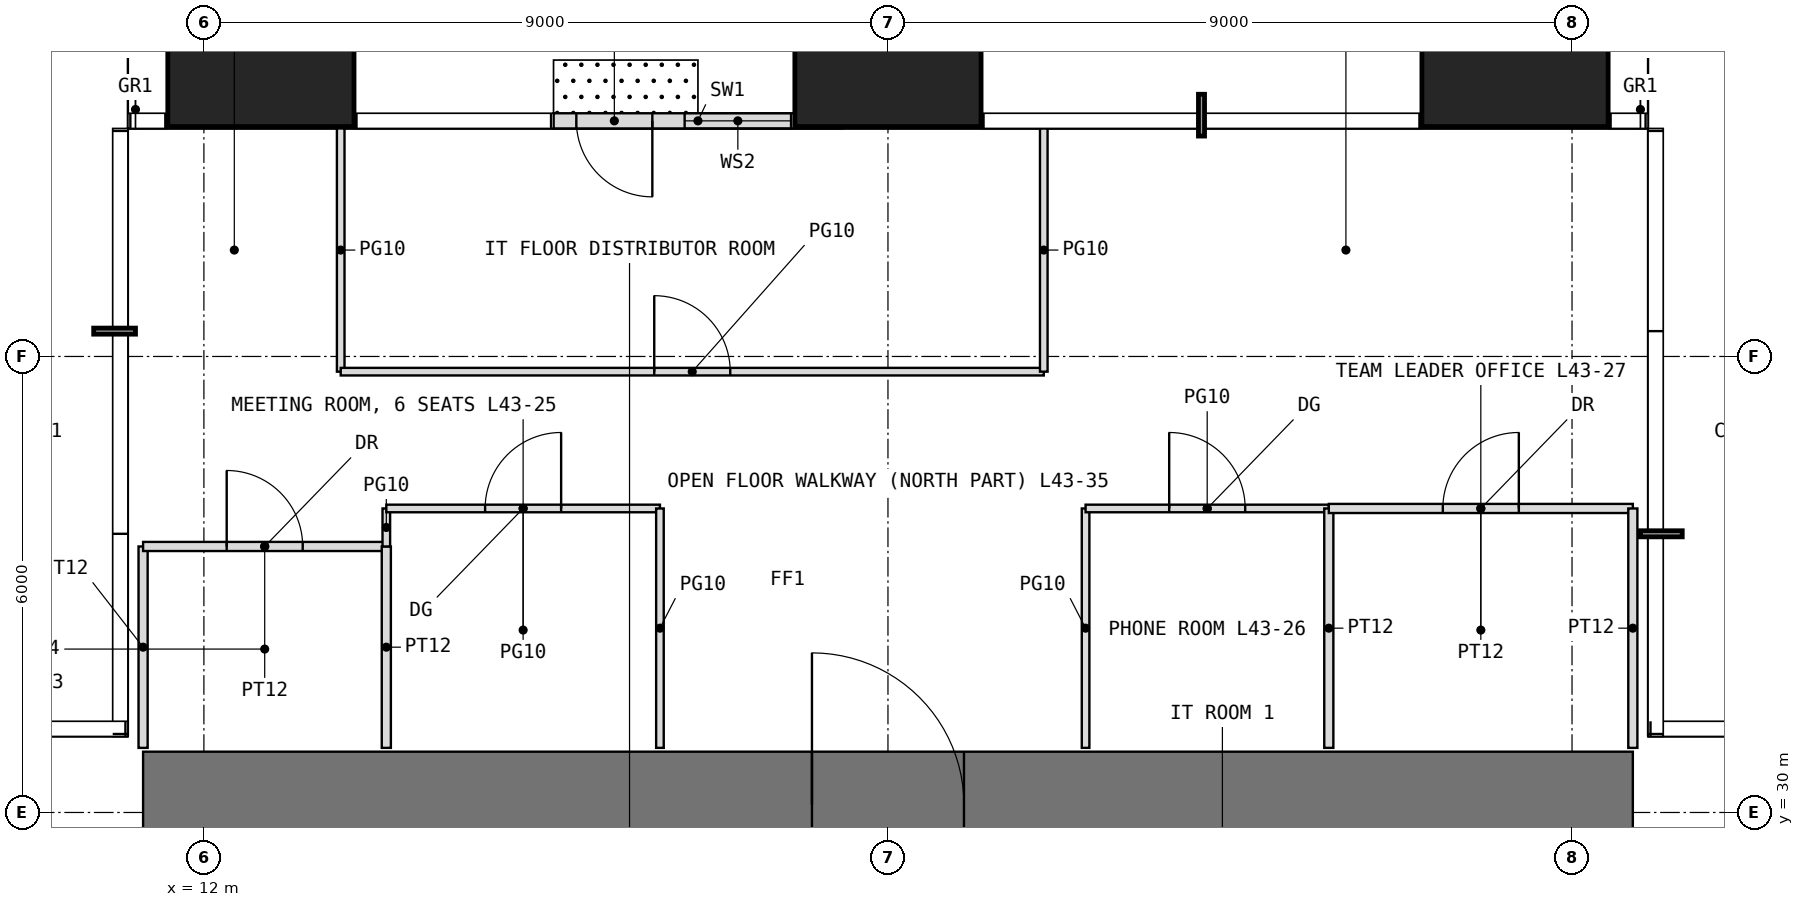
"""IFC4 building model, lengths in metres.
Left out: names, types, materials, properties, quantities, classifications, styles, units other than length and angle.
Written with IfcOpenShell. Run it as: python <this file> out.ifc"""

import sys

from ifc_helpers import new_model, si_unit, direction, frame, frame_2d, origin, origin_2d, place, context, subcontext, project, spatial, rectangle, extrude, element, fill, save


model = new_model("IFC4")
c1 = context("Model", 3, precision=1e-05, world=origin(), true_north=direction((0.0, 1.0)))
c2 = subcontext(c1, "Body", "Model", "MODEL_VIEW")
j1 = project(units=[si_unit("LENGTHUNIT", "METRE"), si_unit("PLANEANGLEUNIT", "RADIAN")], contexts=[c1])
p1 = place(None, origin())
s1 = spatial("IfcSite", under=j1, at=p1, CompositionType="ELEMENT")
p2 = place(p1, origin())
s2 = spatial("IfcBuilding", under=s1, at=p2, CompositionType="ELEMENT")
p3 = place(p2, frame((0.0, 0.0, 182.5)))
s3 = spatial("IfcBuildingStorey", under=s2, at=p3, CompositionType="ELEMENT", Elevation=182.5)
for number, where, z_axis, x_axis in (
    (1, (12.75, 40.25, 0.0), (0.0, 0.0, 1.0), (1.0, 0.0, 0.0)),
    (2, (21.0, 40.25, 0.0), (0.0, 0.0, 1.0), (1.0, 0.0, 0.0)),
    (3, (29.25, 40.25, 0.0), (0.0, 0.0, 1.0), (1.0, 0.0, 0.0)),
):
    element("IfcColumn", number, at=place(p3, frame(where, z_axis=z_axis, x_axis=x_axis)), inside=s3, PredefinedType="COLUMN", context=c2, shape_type="SweptSolid", body=[
        extrude(rectangle(XDim=2.45, YDim=2.45, at=origin_2d()), origin(), (0.0, 0.0, 1.0), 4.0),
    ])
p4 = place(p3, frame((20.4, 39.1, 0.0), z_axis=(0.0, 0.0, 1.0), x_axis=(-1.0, 0.0, 0.0)))
e4 = element("IfcWall", 4, at=p4, inside=s3, PredefinedType="USERDEFINED", context=c2, shape_type="SweptSolid", body=[
    extrude(rectangle(XDim=3.8, YDim=0.2, at=frame_2d((1.9, 0.0))), origin(), (0.0, 0.0, 1.0), 3.75),
])
p5 = place(p4, frame((2.5, 0.0, 0.0)))
e5 = element("IfcOpeningElement", 5, at=p5, cuts=e4, PredefinedType="OPENING", context=c2, shape_type="SweptSolid", body=[
    extrude(rectangle(XDim=1.0, YDim=2.4, at=frame_2d((0.5, 1.2))), frame((0.0, 0.11, 0.0), z_axis=(0.0, -1.0, 0.0), x_axis=(1.0, 0.0, 0.0)), (0.0, 0.0, 1.0), 0.22),
])
p6 = place(p4, frame((0.675, 0.0, 0.3)))
e6 = element("IfcOpeningElement", 6, at=p6, cuts=e4, PredefinedType="OPENING", context=c2, shape_type="SweptSolid", body=[
    extrude(rectangle(XDim=1.4, YDim=2.7, at=frame_2d((0.7, 1.35))), frame((0.0, 0.11, 0.0), z_axis=(0.0, -1.0, 0.0), x_axis=(1.0, 0.0, 0.0)), (0.0, 0.0, 1.0), 0.22),
])
p7 = place(p3, frame((11.2, 30.1, -0.05), z_axis=(0.0, 0.0, 1.0), x_axis=(1.0, 0.0, 0.0)))
e7 = element("IfcWall", 7, at=p7, inside=s3, PredefinedType="SHEAR", context=c2, shape_type="SweptSolid", body=[
    extrude(rectangle(XDim=19.6, YDim=1.4, at=frame_2d((9.8, 0.0))), origin(), (0.0, 0.0, 1.0), 4.0),
])
p8 = place(p7, frame((8.8, 0.0, 0.05)))
e8 = element("IfcOpeningElement", 8, at=p8, cuts=e7, PredefinedType="OPENING", context=c2, shape_type="SweptSolid", body=[
    extrude(rectangle(XDim=2.0, YDim=2.2, at=frame_2d((1.0, 1.1))), frame((0.0, 0.71, 0.0), z_axis=(0.0, -1.0, 0.0), x_axis=(1.0, 0.0, 0.0)), (0.0, 0.0, 1.0), 1.42),
])
p9 = place(p3, frame((11.2, 30.85, 0.0), z_axis=(0.0, 0.0, 1.0), x_axis=(0.0, 1.0, 0.0)))
e9 = element("IfcWall", 9, at=p9, inside=s3, PredefinedType="PARTITIONING", context=c2, shape_type="SweptSolid", body=[
    extrude(rectangle(XDim=2.65, YDim=0.12, at=frame_2d((1.325, 0.0))), origin(), (0.0, 0.0, 1.0), 3.75),
])
p10 = place(p3, frame((11.2, 33.5, 0.0), z_axis=(0.0, 0.0, 1.0), x_axis=(1.0, 0.0, 0.0)))
e10 = element("IfcWall", 10, at=p10, inside=s3, PredefinedType="PARTITIONING", context=c2, shape_type="SweptSolid", body=[
    extrude(rectangle(XDim=3.2, YDim=0.12, at=frame_2d((1.6, 0.0))), origin(), (0.0, 0.0, 1.0), 3.75),
])
p11 = place(p10, frame((1.1, 0.0, 0.0)))
e11 = element("IfcOpeningElement", 11, at=p11, cuts=e10, PredefinedType="OPENING", context=c2, shape_type="SweptSolid", body=[
    extrude(rectangle(XDim=1.0, YDim=2.2, at=frame_2d((0.5, 1.1))), frame((0.0, 0.07, 0.0), z_axis=(0.0, -1.0, 0.0), x_axis=(1.0, 0.0, 0.0)), (0.0, 0.0, 1.0), 0.14),
])
p12 = place(p3, frame((13.8, 35.8, 0.0), z_axis=(0.0, 0.0, 1.0), x_axis=(0.0, 1.0, 0.0)))
e12 = element("IfcWall", 12, at=p12, inside=s3, PredefinedType="PARTITIONING", context=c2, shape_type="SweptSolid", body=[
    extrude(rectangle(XDim=3.2, YDim=0.1, at=frame_2d((1.6, 0.0))), origin(), (0.0, 0.0, 1.0), 3.75),
])
p13 = place(p3, frame((13.8, 35.8, 0.0), z_axis=(0.0, 0.0, 1.0), x_axis=(1.0, 0.0, 0.0)))
e13 = element("IfcWall", 13, at=p13, inside=s3, PredefinedType="PARTITIONING", context=c2, shape_type="SweptSolid", body=[
    extrude(rectangle(XDim=9.25, YDim=0.1, at=frame_2d((4.625, 0.0))), origin(), (0.0, 0.0, 1.0), 3.75),
])
p14 = place(p13, frame((4.125, 0.0, 0.0)))
e14 = element("IfcOpeningElement", 14, at=p14, cuts=e13, PredefinedType="OPENING", context=c2, shape_type="SweptSolid", body=[
    extrude(rectangle(XDim=1.0, YDim=2.4, at=frame_2d((0.5, 1.2))), frame((0.0, 0.06, 0.0), z_axis=(0.0, -1.0, 0.0), x_axis=(1.0, 0.0, 0.0)), (0.0, 0.0, 1.0), 0.12),
])
p15 = place(p3, frame((14.4, 30.85, 0.0), z_axis=(0.0, 0.0, 1.0), x_axis=(0.0, 1.0, 0.0)))
e15 = element("IfcWall", 15, at=p15, inside=s3, PredefinedType="PARTITIONING", context=c2, shape_type="SweptSolid", body=[
    extrude(rectangle(XDim=2.65, YDim=0.12, at=frame_2d((1.325, 0.0))), origin(), (0.0, 0.0, 1.0), 3.75),
])
p16 = place(p3, frame((14.4, 33.5, 0.0), z_axis=(0.0, 0.0, 1.0), x_axis=(0.0, 1.0, 0.0)))
e16 = element("IfcWall", 16, at=p16, inside=s3, PredefinedType="PARTITIONING", context=c2, shape_type="SweptSolid", body=[
    extrude(rectangle(XDim=0.5, YDim=0.1, at=frame_2d((0.25, 0.0))), origin(), (0.0, 0.0, 1.0), 3.75),
])
p17 = place(p3, frame((14.4, 34.0, 0.0), z_axis=(0.0, 0.0, 1.0), x_axis=(1.0, 0.0, 0.0)))
e17 = element("IfcWall", 17, at=p17, inside=s3, PredefinedType="PARTITIONING", context=c2, shape_type="SweptSolid", body=[
    extrude(rectangle(XDim=3.6, YDim=0.1, at=frame_2d((1.8, 0.0))), origin(), (0.0, 0.0, 1.0), 3.75),
])
p18 = place(p17, frame((1.3, 0.0, 0.0)))
e18 = element("IfcOpeningElement", 18, at=p18, cuts=e17, PredefinedType="OPENING", context=c2, shape_type="SweptSolid", body=[
    extrude(rectangle(XDim=1.0, YDim=2.4, at=frame_2d((0.5, 1.2))), frame((0.0, 0.06, 0.0), z_axis=(0.0, -1.0, 0.0), x_axis=(1.0, 0.0, 0.0)), (0.0, 0.0, 1.0), 0.12),
])
p19 = place(p3, frame((18.0, 30.85, 0.0), z_axis=(0.0, 0.0, 1.0), x_axis=(0.0, 1.0, 0.0)))
e19 = element("IfcWall", 19, at=p19, inside=s3, PredefinedType="PARTITIONING", context=c2, shape_type="SweptSolid", body=[
    extrude(rectangle(XDim=3.15, YDim=0.1, at=frame_2d((1.575, 0.0))), origin(), (0.0, 0.0, 1.0), 3.75),
])
p20 = place(p3, frame((23.05, 35.8, 0.0), z_axis=(0.0, 0.0, 1.0), x_axis=(0.0, 1.0, 0.0)))
e20 = element("IfcWall", 20, at=p20, inside=s3, PredefinedType="PARTITIONING", context=c2, shape_type="SweptSolid", body=[
    extrude(rectangle(XDim=3.2, YDim=0.1, at=frame_2d((1.6, 0.0))), origin(), (0.0, 0.0, 1.0), 3.75),
])
p21 = place(p3, frame((23.6, 30.85, 0.0), z_axis=(0.0, 0.0, 1.0), x_axis=(0.0, 1.0, 0.0)))
e21 = element("IfcWall", 21, at=p21, inside=s3, PredefinedType="PARTITIONING", context=c2, shape_type="SweptSolid", body=[
    extrude(rectangle(XDim=3.15, YDim=0.1, at=frame_2d((1.575, 0.0))), origin(), (0.0, 0.0, 1.0), 3.75),
])
p22 = place(p3, frame((23.6, 34.0, 0.0), z_axis=(0.0, 0.0, 1.0), x_axis=(1.0, 0.0, 0.0)))
e22 = element("IfcWall", 22, at=p22, inside=s3, PredefinedType="PARTITIONING", context=c2, shape_type="SweptSolid", body=[
    extrude(rectangle(XDim=3.2, YDim=0.1, at=frame_2d((1.6, 0.0))), origin(), (0.0, 0.0, 1.0), 3.75),
])
p23 = place(p22, frame((1.1, 0.0, 0.0)))
e23 = element("IfcOpeningElement", 23, at=p23, cuts=e22, PredefinedType="OPENING", context=c2, shape_type="SweptSolid", body=[
    extrude(rectangle(XDim=1.0, YDim=2.4, at=frame_2d((0.5, 1.2))), frame((0.0, 0.06, 0.0), z_axis=(0.0, -1.0, 0.0), x_axis=(1.0, 0.0, 0.0)), (0.0, 0.0, 1.0), 0.12),
])
p24 = place(p3, frame((26.8, 30.85, 0.0), z_axis=(0.0, 0.0, 1.0), x_axis=(0.0, 1.0, 0.0)))
e24 = element("IfcWall", 24, at=p24, inside=s3, PredefinedType="PARTITIONING", context=c2, shape_type="SweptSolid", body=[
    extrude(rectangle(XDim=3.15, YDim=0.12, at=frame_2d((1.575, 0.0))), origin(), (0.0, 0.0, 1.0), 3.75),
])
p25 = place(p3, frame((26.8, 34.0, 0.0), z_axis=(0.0, 0.0, 1.0), x_axis=(1.0, 0.0, 0.0)))
e25 = element("IfcWall", 25, at=p25, inside=s3, PredefinedType="PARTITIONING", context=c2, shape_type="SweptSolid", body=[
    extrude(rectangle(XDim=4.0, YDim=0.12, at=frame_2d((2.0, 0.0))), origin(), (0.0, 0.0, 1.0), 3.75),
])
p26 = place(p25, frame((1.5, 0.0, 0.0)))
e26 = element("IfcOpeningElement", 26, at=p26, cuts=e25, PredefinedType="OPENING", context=c2, shape_type="SweptSolid", body=[
    extrude(rectangle(XDim=1.0, YDim=2.2, at=frame_2d((0.5, 1.1))), frame((0.0, 0.07, 0.0), z_axis=(0.0, -1.0, 0.0), x_axis=(1.0, 0.0, 0.0)), (0.0, 0.0, 1.0), 0.14),
])
p27 = place(p3, frame((30.8, 30.85, 0.0), z_axis=(0.0, 0.0, 1.0), x_axis=(0.0, 1.0, 0.0)))
e27 = element("IfcWall", 27, at=p27, inside=s3, PredefinedType="PARTITIONING", context=c2, shape_type="SweptSolid", body=[
    extrude(rectangle(XDim=3.15, YDim=0.12, at=frame_2d((1.575, 0.0))), origin(), (0.0, 0.0, 1.0), 3.75),
])
p28 = place(p5, origin())
e28 = element("IfcDoor", 28, at=p28, inside=s3, OperationType="SINGLE_SWING_LEFT", PredefinedType="DOOR", context=c2, shape_type="SweptSolid", body=[
    extrude(rectangle(XDim=1.0, YDim=2.4, at=frame_2d((0.5, 1.2))), frame((0.0, 0.025, 0.0), z_axis=(0.0, -1.0, 0.0), x_axis=(1.0, 0.0, 0.0)), (0.0, 0.0, 1.0), 0.05),
])
fill(e5, e28)
p29 = place(p6, origin())
e29 = element("IfcWindow", 29, at=p29, inside=s3, PartitioningType="SINGLE_PANEL", PredefinedType="WINDOW", context=c2, shape_type="SweptSolid", body=[
    extrude(rectangle(XDim=1.4, YDim=2.7, at=frame_2d((0.7, 1.35))), frame((0.0, 0.03, 0.0), z_axis=(0.0, -1.0, 0.0), x_axis=(1.0, 0.0, 0.0)), (0.0, 0.0, 1.0), 0.06),
])
fill(e6, e29)
p30 = place(p8, origin())
e30 = element("IfcDoor", 30, at=p30, inside=s3, OperationType="DOUBLE_DOOR_SINGLE_SWING", PredefinedType="DOOR", context=c2, shape_type="SweptSolid", body=[
    extrude(rectangle(XDim=2.0, YDim=2.2, at=frame_2d((1.0, 1.1))), frame((0.0, 0.025, 0.0), z_axis=(0.0, -1.0, 0.0), x_axis=(1.0, 0.0, 0.0)), (0.0, 0.0, 1.0), 0.05),
])
fill(e8, e30)
p31 = place(p11, origin())
e31 = element("IfcDoor", 31, at=p31, inside=s3, OperationType="SINGLE_SWING_LEFT", PredefinedType="DOOR", context=c2, shape_type="SweptSolid", body=[
    extrude(rectangle(XDim=1.0, YDim=2.2, at=frame_2d((0.5, 1.1))), frame((0.0, 0.025, 0.0), z_axis=(0.0, -1.0, 0.0), x_axis=(1.0, 0.0, 0.0)), (0.0, 0.0, 1.0), 0.05),
])
fill(e11, e31)
p32 = place(p18, origin())
e32 = element("IfcDoor", 32, at=p32, inside=s3, OperationType="SINGLE_SWING_RIGHT", PredefinedType="DOOR", context=c2, shape_type="SweptSolid", body=[
    extrude(rectangle(XDim=1.0, YDim=2.4, at=frame_2d((0.5, 1.2))), frame((0.0, 0.025, 0.0), z_axis=(0.0, -1.0, 0.0), x_axis=(1.0, 0.0, 0.0)), (0.0, 0.0, 1.0), 0.05),
])
fill(e18, e32)
p33 = place(p23, origin())
e33 = element("IfcDoor", 33, at=p33, inside=s3, OperationType="SINGLE_SWING_LEFT", PredefinedType="DOOR", context=c2, shape_type="SweptSolid", body=[
    extrude(rectangle(XDim=1.0, YDim=2.4, at=frame_2d((0.5, 1.2))), frame((0.0, 0.025, 0.0), z_axis=(0.0, -1.0, 0.0), x_axis=(1.0, 0.0, 0.0)), (0.0, 0.0, 1.0), 0.05),
])
fill(e23, e33)
p34 = place(p26, origin())
e34 = element("IfcDoor", 34, at=p34, inside=s3, OperationType="SINGLE_SWING_RIGHT", PredefinedType="DOOR", context=c2, shape_type="SweptSolid", body=[
    extrude(rectangle(XDim=1.0, YDim=2.2, at=frame_2d((0.5, 1.1))), frame((0.0, 0.025, 0.0), z_axis=(0.0, -1.0, 0.0), x_axis=(1.0, 0.0, 0.0)), (0.0, 0.0, 1.0), 0.05),
])
fill(e26, e34)
p35 = place(p14, origin())
e35 = element("IfcDoor", 35, at=p35, inside=s3, OperationType="SINGLE_SWING_LEFT", PredefinedType="DOOR", context=c2, shape_type="SweptSolid", body=[
    extrude(rectangle(XDim=1.0, YDim=2.4, at=frame_2d((0.5, 1.2))), frame((0.0, 0.025, 0.0), z_axis=(0.0, -1.0, 0.0), x_axis=(1.0, 0.0, 0.0)), (0.0, 0.0, 1.0), 0.05),
])
fill(e14, e35)
save(model, sys.argv[1])
